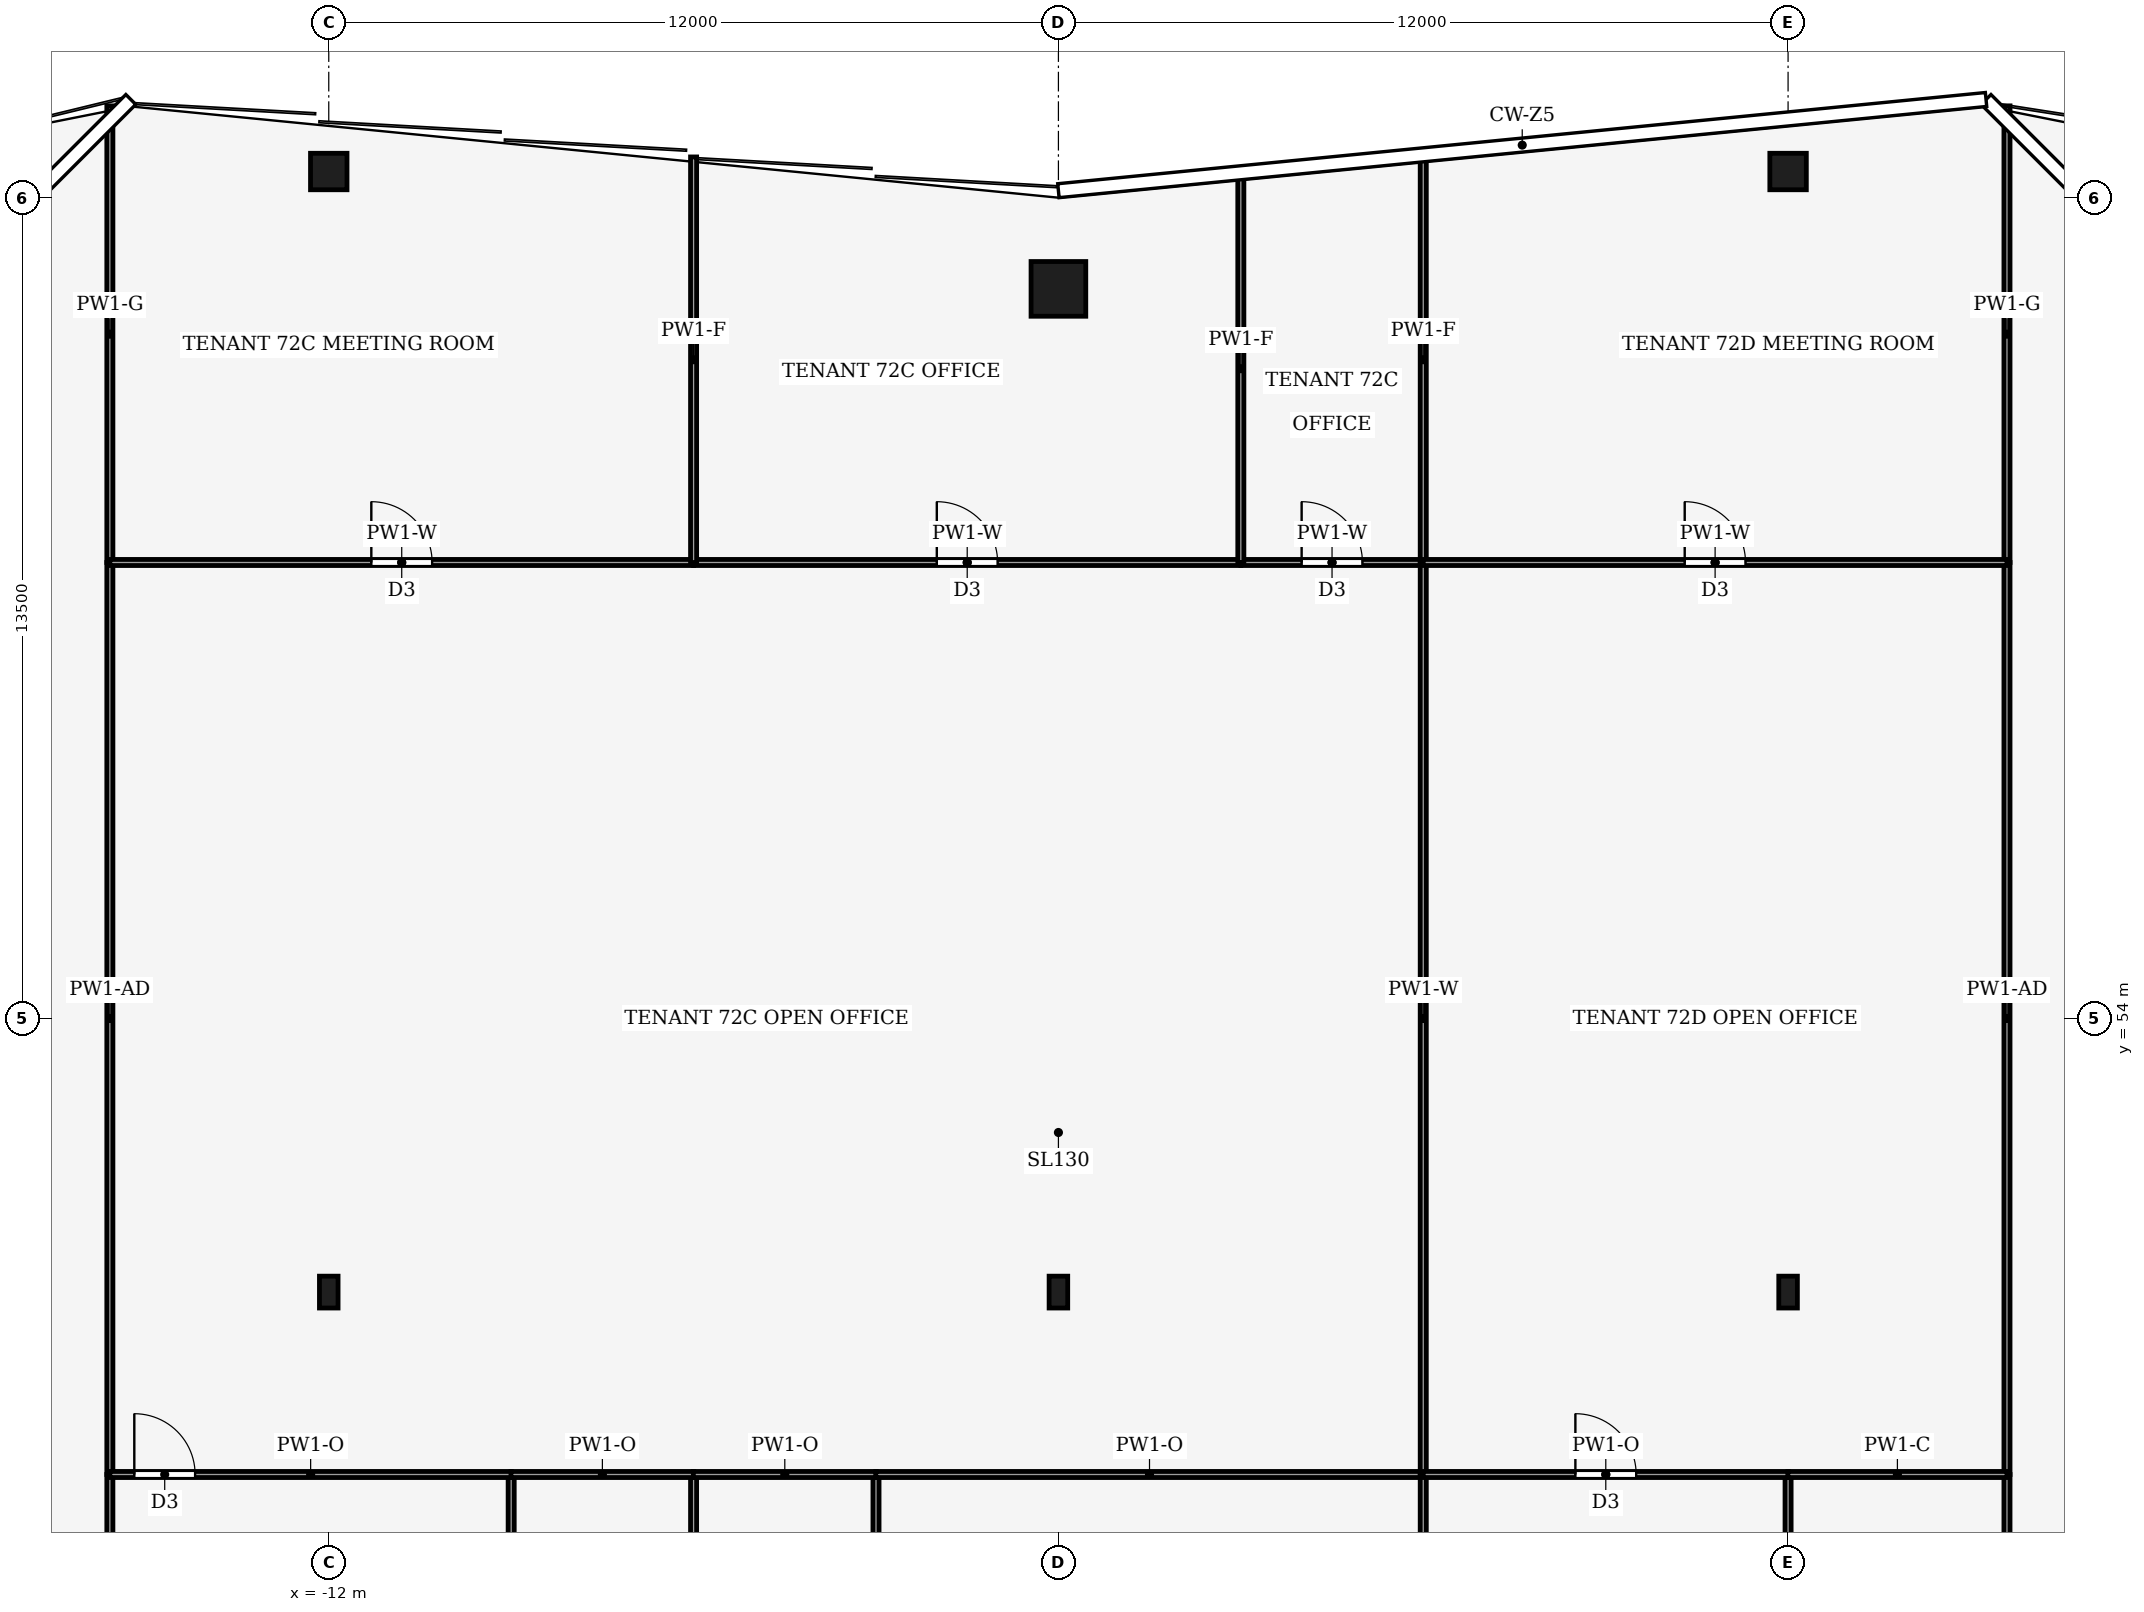
"""IFC4 building model, lengths in metres.
Left out: names, types, materials, properties, quantities, classifications, styles, units other than length and angle.
Written with IfcOpenShell. Run it as: python <this file> out.ifc"""

import sys

from ifc_helpers import new_model, si_unit, direction, frame, frame_2d, origin, origin_2d, place, context, subcontext, project, spatial, rectangle, hollow_rectangle, i_section, extrude, element, fill, save


model = new_model("IFC4")
c1 = context("Model", 3, precision=1e-05, world=origin(), true_north=direction((0.0, 1.0)))
c2 = subcontext(c1, "Body", "Model", "MODEL_VIEW")
j1 = project(units=[si_unit("LENGTHUNIT", "METRE"), si_unit("PLANEANGLEUNIT", "RADIAN")], contexts=[c1])
p1 = place(None, origin())
s1 = spatial("IfcSite", under=j1, at=p1, CompositionType="ELEMENT")
p2 = place(p1, origin())
s2 = spatial("IfcBuilding", under=s1, at=p2, CompositionType="ELEMENT")
p3 = place(p2, frame((0.0, 0.0, 314.0)))
s3 = spatial("IfcBuildingStorey", under=s2, at=p3, CompositionType="ELEMENT", Elevation=314.0)
p4 = place(p3, frame((0.0, 66.0, 0.0), z_axis=(0.0, 0.0, 1.0), x_axis=(1.0, 0.0, 0.0)))
e1 = element("IfcColumn", 1, at=p4, inside=s3, PredefinedType="COLUMN", context=c2, shape_type="SweptSolid", body=[
    extrude(hollow_rectangle(XDim=0.9, YDim=0.9, WallThickness=0.04, at=origin_2d()), origin(), (0.0, 0.0, 1.0), 4.0),
])
for number, where, z_axis, x_axis in (
    (2, (-12.0, 67.93, 0.0), (0.0, 0.0, 1.0), (1.0, 0.0, 0.0)),
    (3, (12.0, 67.93, 0.0), (0.0, 0.0, 1.0), (1.0, 0.0, 0.0)),
):
    element("IfcColumn", number, at=place(p3, frame(where, z_axis=z_axis, x_axis=x_axis)), inside=s3, PredefinedType="COLUMN", context=c2, shape_type="SweptSolid", body=[
        extrude(hollow_rectangle(XDim=0.6, YDim=0.6, WallThickness=0.025, at=origin_2d()), origin(), (0.0, 0.0, 1.0), 4.0),
    ])
for number, where, z_axis, x_axis in (
    (4, (-12.0, 49.5, 0.0), (0.0, 0.0, 1.0), (1.0, 0.0, 0.0)),
    (5, (0.0, 49.5, 0.0), (0.0, 0.0, 1.0), (1.0, 0.0, 0.0)),
    (6, (12.0, 49.5, 0.0), (0.0, 0.0, 1.0), (1.0, 0.0, 0.0)),
):
    element("IfcColumn", number, at=place(p3, frame(where, z_axis=z_axis, x_axis=x_axis)), inside=s3, PredefinedType="COLUMN", context=c2, shape_type="SweptSolid", body=[
        extrude(i_section(OverallWidth=0.306, OverallDepth=0.524, WebThickness=0.012, FlangeThickness=0.04, FilletRadius=0.027, at=origin_2d()), origin(), (0.0, 0.0, 1.0), 4.0),
    ])
p5 = place(p3, frame((-15.6, 40.6, 0.0), z_axis=(0.0, 0.0, 1.0), x_axis=(0.0, 1.0, 0.0)))
e7 = element("IfcWall", 7, at=p5, inside=s3, PredefinedType="PARTITIONING", context=c2, shape_type="SweptSolid", body=[
    extrude(rectangle(XDim=5.9, YDim=0.1, at=frame_2d((2.95, 0.0))), origin(), (0.0, 0.0, 1.0), 3.87),
])
p6 = place(p3, frame((-15.6, 46.5, 0.0), z_axis=(0.0, 0.0, 1.0), x_axis=(0.0, 1.0, 0.0)))
e8 = element("IfcWall", 8, at=p6, inside=s3, PredefinedType="PARTITIONING", context=c2, shape_type="SweptSolid", body=[
    extrude(rectangle(XDim=15.0, YDim=0.1, at=frame_2d((7.5, 0.0))), origin(), (0.0, 0.0, 1.0), 3.35),
])
p7 = place(p3, frame((-15.6, 61.5, 0.0), z_axis=(0.0, 0.0, 1.0), x_axis=(0.0, 1.0, 0.0)))
e9 = element("IfcWall", 9, at=p7, inside=s3, PredefinedType="PARTITIONING", context=c2, shape_type="SweptSolid", body=[
    extrude(rectangle(XDim=7.51, YDim=0.1, at=frame_2d((3.755, 0.0))), origin(), (0.0, 0.0, 1.0), 2.93),
])
p8 = place(p3, frame((15.6, 46.5, 0.0), z_axis=(0.0, 0.0, 1.0), x_axis=(0.0, -1.0, 0.0)))
e10 = element("IfcWall", 10, at=p8, inside=s3, PredefinedType="PARTITIONING", context=c2, shape_type="SweptSolid", body=[
    extrude(rectangle(XDim=5.9, YDim=0.1, at=frame_2d((2.95, 0.0))), origin(), (0.0, 0.0, 1.0), 3.87),
])
p9 = place(p3, frame((15.6, 61.5, 0.0), z_axis=(0.0, 0.0, 1.0), x_axis=(0.0, -1.0, 0.0)))
e11 = element("IfcWall", 11, at=p9, inside=s3, PredefinedType="PARTITIONING", context=c2, shape_type="SweptSolid", body=[
    extrude(rectangle(XDim=15.0, YDim=0.1, at=frame_2d((7.5, 0.0))), origin(), (0.0, 0.0, 1.0), 3.35),
])
p10 = place(p3, frame((15.6, 69.01, 0.0), z_axis=(0.0, 0.0, 1.0), x_axis=(0.0, -1.0, 0.0)))
e12 = element("IfcWall", 12, at=p10, inside=s3, PredefinedType="PARTITIONING", context=c2, shape_type="SweptSolid", body=[
    extrude(rectangle(XDim=7.51, YDim=0.1, at=frame_2d((3.755, 0.0))), origin(), (0.0, 0.0, 1.0), 2.93),
])
p11 = place(p3, frame((-9.0, 46.5, 0.0), z_axis=(0.0, 0.0, 1.0), x_axis=(0.0, -1.0, 0.0)))
e13 = element("IfcWall", 13, at=p11, inside=s3, PredefinedType="PARTITIONING", context=c2, shape_type="SweptSolid", body=[
    extrude(rectangle(XDim=5.9, YDim=0.1, at=frame_2d((2.95, 0.0))), origin(), (0.0, 0.0, 1.0), 3.87),
])
p12 = place(p11, frame((2.45, 0.0, 0.0)))
e14 = element("IfcOpeningElement", 14, at=p12, cuts=e13, PredefinedType="OPENING", context=c2, shape_type="SweptSolid", body=[
    extrude(rectangle(XDim=1.0, YDim=2.1, at=frame_2d((0.5, 1.05))), frame((0.0, 0.06, 0.0), z_axis=(0.0, -1.0, 0.0), x_axis=(1.0, 0.0, 0.0)), (0.0, 0.0, 1.0), 0.12),
])
p13 = place(p3, frame((-15.6, 46.5, 0.0), z_axis=(0.0, 0.0, 1.0), x_axis=(1.0, 0.0, 0.0)))
e15 = element("IfcWall", 15, at=p13, inside=s3, PredefinedType="PARTITIONING", context=c2, shape_type="SweptSolid", body=[
    extrude(rectangle(XDim=6.604, YDim=0.1, at=frame_2d((3.302, 0.0))), origin(), (0.0, 0.0, 1.0), 3.39),
])
p14 = place(p13, frame((0.402, 0.0, 0.0)))
e16 = element("IfcOpeningElement", 16, at=p14, cuts=e15, PredefinedType="OPENING", context=c2, shape_type="SweptSolid", body=[
    extrude(rectangle(XDim=1.0, YDim=2.1, at=frame_2d((0.5, 1.05))), frame((0.0, 0.06, 0.0), z_axis=(0.0, -1.0, 0.0), x_axis=(1.0, 0.0, 0.0)), (0.0, 0.0, 1.0), 0.12),
])
p15 = place(p3, frame((-6.0, 46.5, 0.0), z_axis=(0.0, 0.0, 1.0), x_axis=(0.0, -1.0, 0.0)))
e17 = element("IfcWall", 17, at=p15, inside=s3, PredefinedType="PARTITIONING", context=c2, shape_type="SweptSolid", body=[
    extrude(rectangle(XDim=5.9, YDim=0.1, at=frame_2d((2.95, 0.0))), origin(), (0.0, 0.0, 1.0), 3.87),
])
p16 = place(p15, frame((2.45, 0.0, 0.0)))
e18 = element("IfcOpeningElement", 18, at=p16, cuts=e17, PredefinedType="OPENING", context=c2, shape_type="SweptSolid", body=[
    extrude(rectangle(XDim=1.0, YDim=2.1, at=frame_2d((0.5, 1.05))), frame((0.0, 0.06, 0.0), z_axis=(0.0, -1.0, 0.0), x_axis=(1.0, 0.0, 0.0)), (0.0, 0.0, 1.0), 0.12),
])
p17 = place(p3, frame((-5.996, 46.5, 0.0), z_axis=(0.0, 0.0, 1.0), x_axis=(-1.0, 0.0, 0.0)))
e19 = element("IfcWall", 19, at=p17, inside=s3, PredefinedType="PARTITIONING", context=c2, shape_type="SweptSolid", body=[
    extrude(rectangle(XDim=3.008, YDim=0.1, at=frame_2d((1.504, 0.0))), origin(), (0.0, 0.0, 1.0), 3.39),
])
p18 = place(p3, frame((-3.0, 40.6, 0.0), z_axis=(0.0, 0.0, 1.0), x_axis=(0.0, 1.0, 0.0)))
e20 = element("IfcWall", 20, at=p18, inside=s3, PredefinedType="PARTITIONING", context=c2, shape_type="SweptSolid", body=[
    extrude(rectangle(XDim=5.9, YDim=0.1, at=frame_2d((2.95, 0.0))), origin(), (0.0, 0.0, 1.0), 3.87),
])
p19 = place(p3, frame((-2.996, 46.5, 0.0), z_axis=(0.0, 0.0, 1.0), x_axis=(-1.0, 0.0, 0.0)))
e21 = element("IfcWall", 21, at=p19, inside=s3, PredefinedType="PARTITIONING", context=c2, shape_type="SweptSolid", body=[
    extrude(rectangle(XDim=3.008, YDim=0.1, at=frame_2d((1.504, 0.0))), origin(), (0.0, 0.0, 1.0), 3.39),
])
p20 = place(p3, frame((6.0, 46.5, 0.0), z_axis=(0.0, 0.0, 1.0), x_axis=(-1.0, 0.0, 0.0)))
e22 = element("IfcWall", 22, at=p20, inside=s3, PredefinedType="PARTITIONING", context=c2, shape_type="SweptSolid", body=[
    extrude(rectangle(XDim=9.004, YDim=0.1, at=frame_2d((4.502, 0.0))), origin(), (0.0, 0.0, 1.0), 3.39),
])
p21 = place(p3, frame((6.0, 40.6, 0.0), z_axis=(0.0, 0.0, 1.0), x_axis=(0.0, 1.0, 0.0)))
e23 = element("IfcWall", 23, at=p21, inside=s3, PredefinedType="PARTITIONING", context=c2, shape_type="SweptSolid", body=[
    extrude(rectangle(XDim=5.9, YDim=0.1, at=frame_2d((2.95, 0.0))), origin(), (0.0, 0.0, 1.0), 3.87),
])
p22 = place(p3, frame((-15.6, 61.5, 0.0), z_axis=(0.0, 0.0, 1.0), x_axis=(1.0, 0.0, 0.0)))
e24 = element("IfcWall", 24, at=p22, inside=s3, PredefinedType="PARTITIONING", context=c2, shape_type="SweptSolid", body=[
    extrude(rectangle(XDim=9.6, YDim=0.1, at=frame_2d((4.8, 0.0))), origin(), (0.0, 0.0, 1.0), 3.24),
])
p23 = place(p22, frame((4.3, 0.0, 0.0)))
e25 = element("IfcOpeningElement", 25, at=p23, cuts=e24, PredefinedType="OPENING", context=c2, shape_type="SweptSolid", body=[
    extrude(rectangle(XDim=1.0, YDim=2.1, at=frame_2d((0.5, 1.05))), frame((0.0, 0.06, 0.0), z_axis=(0.0, -1.0, 0.0), x_axis=(1.0, 0.0, 0.0)), (0.0, 0.0, 1.0), 0.12),
])
p24 = place(p3, frame((-6.0, 61.5, 0.0), z_axis=(0.0, 0.0, 1.0), x_axis=(1.0, 0.0, 0.0)))
e26 = element("IfcWall", 26, at=p24, inside=s3, PredefinedType="PARTITIONING", context=c2, shape_type="SweptSolid", body=[
    extrude(rectangle(XDim=9.0, YDim=0.1, at=frame_2d((4.5, 0.0))), origin(), (0.0, 0.0, 1.0), 3.24),
])
p25 = place(p24, frame((4.0, 0.0, 0.0)))
e27 = element("IfcOpeningElement", 27, at=p25, cuts=e26, PredefinedType="OPENING", context=c2, shape_type="SweptSolid", body=[
    extrude(rectangle(XDim=1.0, YDim=2.1, at=frame_2d((0.5, 1.05))), frame((0.0, 0.06, 0.0), z_axis=(0.0, -1.0, 0.0), x_axis=(1.0, 0.0, 0.0)), (0.0, 0.0, 1.0), 0.12),
])
p26 = place(p3, frame((3.0, 61.5, 0.0), z_axis=(0.0, 0.0, 1.0), x_axis=(1.0, 0.0, 0.0)))
e28 = element("IfcWall", 28, at=p26, inside=s3, PredefinedType="PARTITIONING", context=c2, shape_type="SweptSolid", body=[
    extrude(rectangle(XDim=3.0, YDim=0.1, at=frame_2d((1.5, 0.0))), origin(), (0.0, 0.0, 1.0), 3.24),
])
p27 = place(p26, frame((1.0, 0.0, 0.0)))
e29 = element("IfcOpeningElement", 29, at=p27, cuts=e28, PredefinedType="OPENING", context=c2, shape_type="SweptSolid", body=[
    extrude(rectangle(XDim=1.0, YDim=2.1, at=frame_2d((0.5, 1.05))), frame((0.0, 0.06, 0.0), z_axis=(0.0, -1.0, 0.0), x_axis=(1.0, 0.0, 0.0)), (0.0, 0.0, 1.0), 0.12),
])
p28 = place(p3, frame((6.0, 46.5, 0.0), z_axis=(0.0, 0.0, 1.0), x_axis=(0.0, 1.0, 0.0)))
e30 = element("IfcWall", 30, at=p28, inside=s3, PredefinedType="PARTITIONING", context=c2, shape_type="SweptSolid", body=[
    extrude(rectangle(XDim=15.0, YDim=0.1, at=frame_2d((7.5, 0.0))), origin(), (0.0, 0.0, 1.0), 3.24),
])
p29 = place(p3, frame((-6.0, 61.5, 0.0), z_axis=(0.0, 0.0, 1.0), x_axis=(0.0, 1.0, 0.0)))
e31 = element("IfcWall", 31, at=p29, inside=s3, PredefinedType="PARTITIONING", context=c2, shape_type="SweptSolid", body=[
    extrude(rectangle(XDim=6.67, YDim=0.1, at=frame_2d((3.335, 0.0))), origin(), (0.0, 0.0, 1.0), 3.04),
])
p30 = place(p3, frame((3.0, 61.5, 0.0), z_axis=(0.0, 0.0, 1.0), x_axis=(0.0, 1.0, 0.0)))
e32 = element("IfcWall", 32, at=p30, inside=s3, PredefinedType="PARTITIONING", context=c2, shape_type="SweptSolid", body=[
    extrude(rectangle(XDim=6.375, YDim=0.1, at=frame_2d((3.188, 0.0))), origin(), (0.0, 0.0, 1.0), 3.04),
])
p31 = place(p3, frame((6.0, 61.5, 0.0), z_axis=(0.0, 0.0, 1.0), x_axis=(0.0, 1.0, 0.0)))
e33 = element("IfcWall", 33, at=p31, inside=s3, PredefinedType="PARTITIONING", context=c2, shape_type="SweptSolid", body=[
    extrude(rectangle(XDim=6.67, YDim=0.1, at=frame_2d((3.335, 0.0))), origin(), (0.0, 0.0, 1.0), 3.04),
])
p32 = place(p3, frame((12.0, 46.5, 0.0), z_axis=(0.0, 0.0, 1.0), x_axis=(0.0, -1.0, 0.0)))
e34 = element("IfcWall", 34, at=p32, inside=s3, PredefinedType="PARTITIONING", context=c2, shape_type="SweptSolid", body=[
    extrude(rectangle(XDim=5.9, YDim=0.1, at=frame_2d((2.95, 0.0))), origin(), (0.0, 0.0, 1.0), 3.39),
])
p33 = place(p32, frame((2.45, 0.0, 0.0)))
e35 = element("IfcOpeningElement", 35, at=p33, cuts=e34, PredefinedType="OPENING", context=c2, shape_type="SweptSolid", body=[
    extrude(rectangle(XDim=1.0, YDim=2.1, at=frame_2d((0.5, 1.05))), frame((0.0, 0.06, 0.0), z_axis=(0.0, -1.0, 0.0), x_axis=(1.0, 0.0, 0.0)), (0.0, 0.0, 1.0), 0.12),
])
p34 = place(p3, frame((6.0, 46.5, 0.0), z_axis=(0.0, 0.0, 1.0), x_axis=(1.0, 0.0, 0.0)))
e36 = element("IfcWall", 36, at=p34, inside=s3, PredefinedType="PARTITIONING", context=c2, shape_type="SweptSolid", body=[
    extrude(rectangle(XDim=6.004, YDim=0.1, at=frame_2d((3.002, 0.0))), origin(), (0.0, 0.0, 1.0), 3.39),
])
p35 = place(p34, frame((2.502, 0.0, 0.0)))
e37 = element("IfcOpeningElement", 37, at=p35, cuts=e36, PredefinedType="OPENING", context=c2, shape_type="SweptSolid", body=[
    extrude(rectangle(XDim=1.0, YDim=2.1, at=frame_2d((0.5, 1.05))), frame((0.0, 0.06, 0.0), z_axis=(0.0, -1.0, 0.0), x_axis=(1.0, 0.0, 0.0)), (0.0, 0.0, 1.0), 0.12),
])
p36 = place(p3, frame((15.6, 46.5, 0.0), z_axis=(0.0, 0.0, 1.0), x_axis=(-1.0, 0.0, 0.0)))
e38 = element("IfcWall", 38, at=p36, inside=s3, PredefinedType="PARTITIONING", context=c2, shape_type="SweptSolid", body=[
    extrude(rectangle(XDim=3.604, YDim=0.1, at=frame_2d((1.802, 0.0))), origin(), (0.0, 0.0, 1.0), 3.87),
])
p37 = place(p3, frame((6.0, 61.5, 0.0), z_axis=(0.0, 0.0, 1.0), x_axis=(1.0, 0.0, 0.0)))
e39 = element("IfcWall", 39, at=p37, inside=s3, PredefinedType="PARTITIONING", context=c2, shape_type="SweptSolid", body=[
    extrude(rectangle(XDim=9.6, YDim=0.1, at=frame_2d((4.8, 0.0))), origin(), (0.0, 0.0, 1.0), 3.24),
])
p38 = place(p37, frame((4.3, 0.0, 0.0)))
e40 = element("IfcOpeningElement", 40, at=p38, cuts=e39, PredefinedType="OPENING", context=c2, shape_type="SweptSolid", body=[
    extrude(rectangle(XDim=1.0, YDim=2.1, at=frame_2d((0.5, 1.05))), frame((0.0, 0.06, 0.0), z_axis=(0.0, -1.0, 0.0), x_axis=(1.0, 0.0, 0.0)), (0.0, 0.0, 1.0), 0.12),
])
p39 = place(p14, origin())
e41 = element("IfcDoor", 41, at=p39, inside=s3, OperationType="SINGLE_SWING_LEFT", PredefinedType="DOOR", context=c2, shape_type="SweptSolid", body=[
    extrude(rectangle(XDim=1.0, YDim=2.1, at=frame_2d((0.5, 1.05))), frame((0.0, 0.025, 0.0), z_axis=(0.0, -1.0, 0.0), x_axis=(1.0, 0.0, 0.0)), (0.0, 0.0, 1.0), 0.05),
])
fill(e16, e41)
p40 = place(p23, origin())
e42 = element("IfcDoor", 42, at=p40, inside=s3, OperationType="SINGLE_SWING_RIGHT", PredefinedType="DOOR", context=c2, shape_type="SweptSolid", body=[
    extrude(rectangle(XDim=1.0, YDim=2.1, at=frame_2d((0.5, 1.05))), frame((0.0, 0.025, 0.0), z_axis=(0.0, -1.0, 0.0), x_axis=(1.0, 0.0, 0.0)), (0.0, 0.0, 1.0), 0.05),
])
fill(e25, e42)
p41 = place(p25, origin())
e43 = element("IfcDoor", 43, at=p41, inside=s3, OperationType="SINGLE_SWING_LEFT", PredefinedType="DOOR", context=c2, shape_type="SweptSolid", body=[
    extrude(rectangle(XDim=1.0, YDim=2.1, at=frame_2d((0.5, 1.05))), frame((0.0, 0.025, 0.0), z_axis=(0.0, -1.0, 0.0), x_axis=(1.0, 0.0, 0.0)), (0.0, 0.0, 1.0), 0.05),
])
fill(e27, e43)
p42 = place(p27, origin())
e44 = element("IfcDoor", 44, at=p42, inside=s3, OperationType="SINGLE_SWING_RIGHT", PredefinedType="DOOR", context=c2, shape_type="SweptSolid", body=[
    extrude(rectangle(XDim=1.0, YDim=2.1, at=frame_2d((0.5, 1.05))), frame((0.0, 0.025, 0.0), z_axis=(0.0, -1.0, 0.0), x_axis=(1.0, 0.0, 0.0)), (0.0, 0.0, 1.0), 0.05),
])
fill(e29, e44)
p43 = place(p35, origin())
e45 = element("IfcDoor", 45, at=p43, inside=s3, OperationType="SINGLE_SWING_RIGHT", PredefinedType="DOOR", context=c2, shape_type="SweptSolid", body=[
    extrude(rectangle(XDim=1.0, YDim=2.1, at=frame_2d((0.5, 1.05))), frame((0.0, 0.025, 0.0), z_axis=(0.0, -1.0, 0.0), x_axis=(1.0, 0.0, 0.0)), (0.0, 0.0, 1.0), 0.05),
])
fill(e37, e45)
p44 = place(p38, origin())
e46 = element("IfcDoor", 46, at=p44, inside=s3, OperationType="SINGLE_SWING_LEFT", PredefinedType="DOOR", context=c2, shape_type="SweptSolid", body=[
    extrude(rectangle(XDim=1.0, YDim=2.1, at=frame_2d((0.5, 1.05))), frame((0.0, 0.025, 0.0), z_axis=(0.0, -1.0, 0.0), x_axis=(1.0, 0.0, 0.0)), (0.0, 0.0, 1.0), 0.05),
])
fill(e40, e46)
save(model, sys.argv[1])
